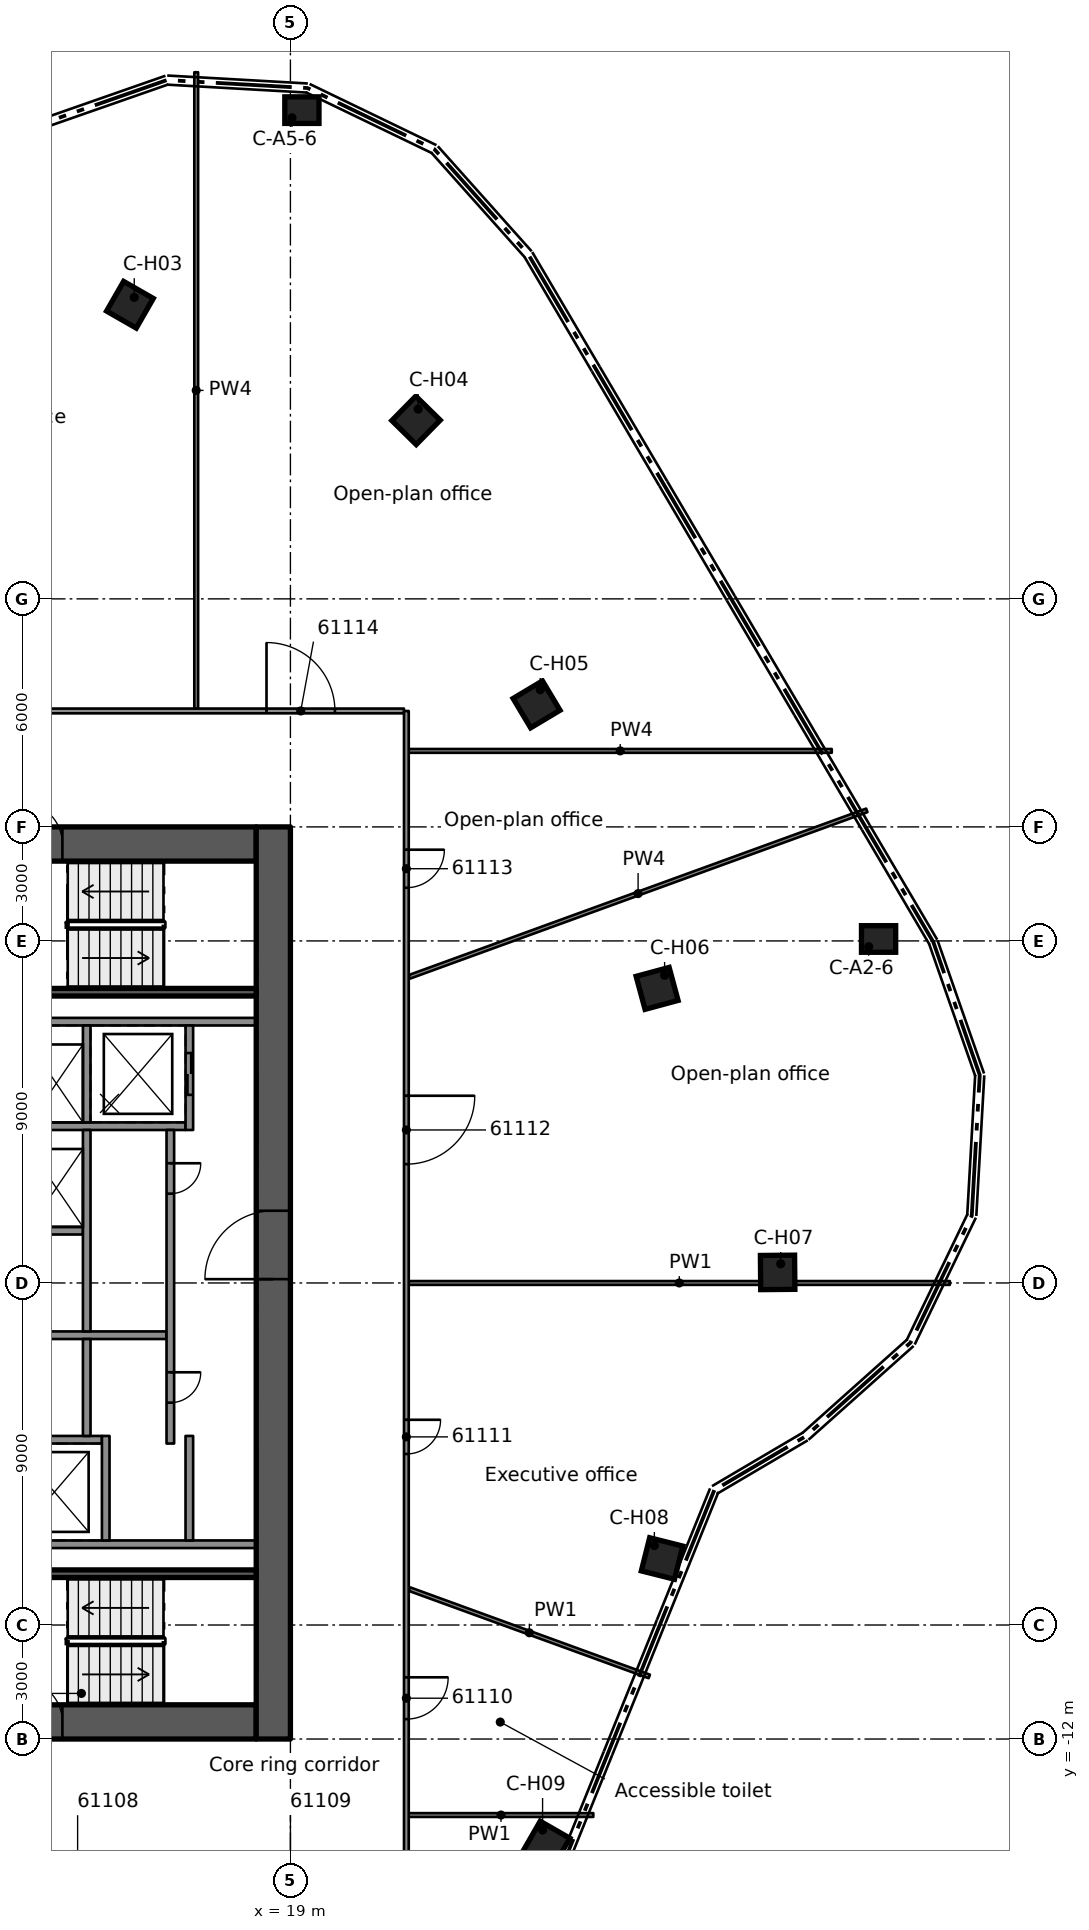
"""IFC4 building model, lengths in metres.
Left out: names, types, materials, properties, quantities, classifications, styles, units other than length and angle.
Written with IfcOpenShell. Run it as: python <this file> out.ifc"""

import sys

from ifc_helpers import new_model, si_unit, direction, frame, frame_2d, origin, origin_2d, place, context, subcontext, project, spatial, rectangle, extrude, element, fill, save


model = new_model("IFC4")
c1 = context("Model", 3, precision=1e-05, world=origin(), true_north=direction((0.0, 1.0)))
c2 = subcontext(c1, "Body", "Model", "MODEL_VIEW")
j1 = project(units=[si_unit("LENGTHUNIT", "METRE"), si_unit("PLANEANGLEUNIT", "RADIAN")], contexts=[c1])
p1 = place(None, origin())
s1 = spatial("IfcSite", under=j1, at=p1, CompositionType="ELEMENT")
p2 = place(p1, origin())
s2 = spatial("IfcBuilding", under=s1, at=p2, CompositionType="ELEMENT")
p3 = place(p2, frame((0.0, 0.0, 296.4)))
s3 = spatial("IfcBuildingStorey", under=s2, at=p3, CompositionType="ELEMENT", Elevation=296.4)
p4 = place(p3, frame((8.9, 11.55, 0.0), z_axis=(0.0, 0.0, 1.0), x_axis=(1.0, 0.0, 0.0)))
e1 = element("IfcWall", 1, at=p4, inside=s3, PredefinedType="SHEAR", context=c2, shape_type="SweptSolid", body=[
    extrude(rectangle(XDim=9.2, YDim=0.9, at=frame_2d((4.6, 0.0))), origin(), (0.0, 0.0, 1.0), 3.5),
])
p5 = place(p4, frame((3.0, 0.0, 0.0)))
e2 = element("IfcOpeningElement", 2, at=p5, cuts=e1, PredefinedType="OPENING", context=c2, shape_type="SweptSolid", body=[
    extrude(rectangle(XDim=1.1, YDim=2.1, at=frame_2d((0.55, 1.05))), frame((0.0, 0.46, 0.0), z_axis=(0.0, -1.0, 0.0), x_axis=(1.0, 0.0, 0.0)), (0.0, 0.0, 1.0), 0.92),
])
p6 = place(p4, frame((0.77, 0.0, 0.0)))
e3 = element("IfcOpeningElement", 3, at=p6, cuts=e1, PredefinedType="OPENING", context=c2, shape_type="SweptSolid", body=[
    extrude(rectangle(XDim=0.9, YDim=2.1, at=frame_2d((0.45, 1.05))), frame((0.0, 0.46, 0.0), z_axis=(0.0, -1.0, 0.0), x_axis=(1.0, 0.0, 0.0)), (0.0, 0.0, 1.0), 0.92),
])
p7 = place(p3, frame((8.9, -11.55, 0.0), z_axis=(0.0, 0.0, 1.0), x_axis=(1.0, 0.0, 0.0)))
e4 = element("IfcWall", 4, at=p7, inside=s3, PredefinedType="SHEAR", context=c2, shape_type="SweptSolid", body=[
    extrude(rectangle(XDim=9.2, YDim=0.9, at=frame_2d((4.6, 0.0))), origin(), (0.0, 0.0, 1.0), 3.5),
])
p8 = place(p7, frame((3.0, 0.0, 0.0)))
e5 = element("IfcOpeningElement", 5, at=p8, cuts=e4, PredefinedType="OPENING", context=c2, shape_type="SweptSolid", body=[
    extrude(rectangle(XDim=1.1, YDim=2.1, at=frame_2d((0.55, 1.05))), frame((0.0, 0.46, 0.0), z_axis=(0.0, -1.0, 0.0), x_axis=(1.0, 0.0, 0.0)), (0.0, 0.0, 1.0), 0.92),
])
p9 = place(p3, frame((18.55, -12.0, 0.0), z_axis=(0.0, 0.0, 1.0), x_axis=(0.0, 1.0, 0.0)))
e6 = element("IfcWall", 6, at=p9, inside=s3, PredefinedType="SHEAR", context=c2, shape_type="SweptSolid", body=[
    extrude(rectangle(XDim=24.0, YDim=0.9, at=frame_2d((12.0, 0.0))), origin(), (0.0, 0.0, 1.0), 3.5),
])
p10 = place(p9, frame((12.1, 0.0, 0.0)))
e7 = element("IfcOpeningElement", 7, at=p10, cuts=e6, PredefinedType="OPENING", context=c2, shape_type="SweptSolid", body=[
    extrude(rectangle(XDim=1.8, YDim=2.1, at=frame_2d((0.9, 1.05))), frame((0.0, 0.46, 0.0), z_axis=(0.0, -1.0, 0.0), x_axis=(1.0, 0.0, 0.0)), (0.0, 0.0, 1.0), 0.92),
])
for number, where, z_axis, x_axis in (
    (8, (34.477, 9.051, 0.0), (0.0, 0.0, 1.0), (1.0, 0.0, 0.0)),
    (9, (19.302, 30.86, 0.0), (0.0, 0.0, 1.0), (1.0, 0.0, 0.0)),
):
    element("IfcColumn", number, at=place(p3, frame(where, z_axis=z_axis, x_axis=x_axis)), inside=s3, PredefinedType="COLUMN", context=c2, shape_type="SweptSolid", body=[
        extrude(rectangle(XDim=0.9, YDim=0.7, at=origin_2d()), origin(), (0.0, 0.0, 1.0), 3.5),
    ])
for number, where, z_axis, x_axis in (
    (10, (14.777, 25.739, 0.0), (0.0, 0.0, 1.0), (0.498, 0.867, 0.0)),
    (11, (22.305, 22.697, 0.0), (0.0, 0.0, 1.0), (0.701, 0.713, 0.0)),
    (12, (25.477, 15.224, 0.0), (0.0, 0.0, 1.0), (0.858, 0.513, 0.0)),
    (13, (28.649, 7.751, 0.0), (0.0, 0.0, 1.0), (0.965, 0.261, 0.0)),
    (14, (31.821, 0.278, 0.0), (0.0, 0.0, 1.0), (1.0, 0.009, 0.0)),
    (15, (28.78, -7.25, 0.0), (0.0, 0.0, 1.0), (0.97, -0.244, 0.0)),
    (16, (25.739, -14.777, 0.0), (0.0, 0.0, 1.0), (0.867, -0.498, 0.0)),
):
    element("IfcColumn", number, at=place(p3, frame(where, z_axis=z_axis, x_axis=x_axis)), inside=s3, PredefinedType="COLUMN", context=c2, shape_type="SweptSolid", body=[
        extrude(rectangle(XDim=0.9, YDim=0.9, at=origin_2d()), origin(), (0.0, 0.0, 1.0), 3.5),
    ])
for number, where, z_axis, x_axis in (
    (17, (11.54, -6.875, 0.0), (0.0, 0.0, 1.0), (1.0, 0.0, 0.0)),
    (18, (11.54, 6.875, 0.0), (0.0, 0.0, 1.0), (1.0, 0.0, 0.0)),
):
    element("IfcWall", number, at=place(p3, frame(where, z_axis=z_axis, x_axis=x_axis)), inside=s3, PredefinedType="SOLIDWALL", context=c2, shape_type="SweptSolid", body=[
        extrude(rectangle(XDim=6.56, YDim=0.2, at=frame_2d((3.28, 0.0))), origin(), (0.0, 0.0, 1.0), 3.05),
    ])
p11 = place(p3, frame((11.54, 4.125, 0.0), z_axis=(0.0, 0.0, 1.0), x_axis=(1.0, 0.0, 0.0)))
e19 = element("IfcWall", 19, at=p11, inside=s3, PredefinedType="SOLIDWALL", context=c2, shape_type="SweptSolid", body=[
    extrude(rectangle(XDim=4.7, YDim=0.2, at=frame_2d((2.35, 0.0))), origin(), (0.0, 0.0, 1.0), 3.05),
])
p12 = place(p3, frame((11.54, 1.375, 0.0), z_axis=(0.0, 0.0, 1.0), x_axis=(1.0, 0.0, 0.0)))
e20 = element("IfcWall", 20, at=p12, inside=s3, PredefinedType="SOLIDWALL", context=c2, shape_type="SweptSolid", body=[
    extrude(rectangle(XDim=2.0, YDim=0.2, at=frame_2d((1.0, 0.0))), origin(), (0.0, 0.0, 1.0), 3.05),
])
p13 = place(p3, frame((11.54, -1.375, 0.0), z_axis=(0.0, 0.0, 1.0), x_axis=(1.0, 0.0, 0.0)))
e21 = element("IfcWall", 21, at=p13, inside=s3, PredefinedType="SOLIDWALL", context=c2, shape_type="SweptSolid", body=[
    extrude(rectangle(XDim=4.2, YDim=0.2, at=frame_2d((2.1, 0.0))), origin(), (0.0, 0.0, 1.0), 3.05),
])
p14 = place(p3, frame((11.54, -4.125, 0.0), z_axis=(0.0, 0.0, 1.0), x_axis=(1.0, 0.0, 0.0)))
e22 = element("IfcWall", 22, at=p14, inside=s3, PredefinedType="SOLIDWALL", context=c2, shape_type="SweptSolid", body=[
    extrude(rectangle(XDim=2.5, YDim=0.2, at=frame_2d((1.25, 0.0))), origin(), (0.0, 0.0, 1.0), 3.05),
])
p15 = place(p3, frame((13.64, 6.775, 0.0), z_axis=(0.0, 0.0, 1.0), x_axis=(0.0, -1.0, 0.0)))
e23 = element("IfcWall", 23, at=p15, inside=s3, PredefinedType="SOLIDWALL", context=c2, shape_type="SweptSolid", body=[
    extrude(rectangle(XDim=2.55, YDim=0.2, at=frame_2d((1.275, 0.0))), origin(), (0.0, 0.0, 1.0), 3.05),
])
p16 = place(p3, frame((13.64, 4.025, 0.0), z_axis=(0.0, 0.0, 1.0), x_axis=(0.0, -1.0, 0.0)))
e24 = element("IfcWall", 24, at=p16, inside=s3, PredefinedType="SOLIDWALL", context=c2, shape_type="SweptSolid", body=[
    extrude(rectangle(XDim=5.3, YDim=0.2, at=frame_2d((2.65, 0.0))), origin(), (0.0, 0.0, 1.0), 3.05),
])
p17 = place(p3, frame((13.64, -1.475, 0.0), z_axis=(0.0, 0.0, 1.0), x_axis=(0.0, -1.0, 0.0)))
e25 = element("IfcWall", 25, at=p17, inside=s3, PredefinedType="SOLIDWALL", context=c2, shape_type="SweptSolid", body=[
    extrude(rectangle(XDim=2.55, YDim=0.2, at=frame_2d((1.275, 0.0))), origin(), (0.0, 0.0, 1.0), 3.05),
])
p18 = place(p3, frame((14.14, -4.025, 0.0), z_axis=(0.0, 0.0, 1.0), x_axis=(0.0, -1.0, 0.0)))
e26 = element("IfcWall", 26, at=p18, inside=s3, PredefinedType="SOLIDWALL", context=c2, shape_type="SweptSolid", body=[
    extrude(rectangle(XDim=2.75, YDim=0.2, at=frame_2d((1.375, 0.0))), origin(), (0.0, 0.0, 1.0), 3.05),
])
p19 = place(p3, frame((16.34, 6.775, 0.0), z_axis=(0.0, 0.0, 1.0), x_axis=(0.0, -1.0, 0.0)))
e27 = element("IfcWall", 27, at=p19, inside=s3, PredefinedType="SOLIDWALL", context=c2, shape_type="SweptSolid", body=[
    extrude(rectangle(XDim=2.75, YDim=0.2, at=frame_2d((1.375, 0.0))), origin(), (0.0, 0.0, 1.0), 3.05),
])
p20 = place(p19, frame((0.725, 0.0, 0.0)))
e28 = element("IfcOpeningElement", 28, at=p20, cuts=e27, PredefinedType="OPENING", context=c2, shape_type="SweptSolid", body=[
    extrude(rectangle(XDim=1.1, YDim=2.1, at=frame_2d((0.55, 1.05))), frame((0.0, 0.11, 0.0), z_axis=(0.0, -1.0, 0.0), x_axis=(1.0, 0.0, 0.0)), (0.0, 0.0, 1.0), 0.22),
])
p21 = place(p3, frame((15.84, 4.025, 0.0), z_axis=(0.0, 0.0, 1.0), x_axis=(0.0, -1.0, 0.0)))
e29 = element("IfcWall", 29, at=p21, inside=s3, PredefinedType="SOLIDWALL", context=c2, shape_type="SweptSolid", body=[
    extrude(rectangle(XDim=8.25, YDim=0.2, at=frame_2d((4.125, 0.0))), origin(), (0.0, 0.0, 1.0), 3.05),
])
p22 = place(p21, frame((0.875, 0.0, 0.0)))
e30 = element("IfcOpeningElement", 30, at=p22, cuts=e29, PredefinedType="OPENING", context=c2, shape_type="SweptSolid", body=[
    extrude(rectangle(XDim=0.8, YDim=2.1, at=frame_2d((0.4, 1.05))), frame((0.0, 0.11, 0.0), z_axis=(0.0, -1.0, 0.0), x_axis=(1.0, 0.0, 0.0)), (0.0, 0.0, 1.0), 0.22),
])
p23 = place(p21, frame((6.375, 0.0, 0.0)))
e31 = element("IfcOpeningElement", 31, at=p23, cuts=e29, PredefinedType="OPENING", context=c2, shape_type="SweptSolid", body=[
    extrude(rectangle(XDim=0.8, YDim=2.1, at=frame_2d((0.4, 1.05))), frame((0.0, 0.11, 0.0), z_axis=(0.0, -1.0, 0.0), x_axis=(1.0, 0.0, 0.0)), (0.0, 0.0, 1.0), 0.22),
])
p24 = place(p3, frame((16.34, -4.025, 0.0), z_axis=(0.0, 0.0, 1.0), x_axis=(0.0, -1.0, 0.0)))
e32 = element("IfcWall", 32, at=p24, inside=s3, PredefinedType="SOLIDWALL", context=c2, shape_type="SweptSolid", body=[
    extrude(rectangle(XDim=2.75, YDim=0.2, at=frame_2d((1.375, 0.0))), origin(), (0.0, 0.0, 1.0), 3.05),
])
for number, where, z_axis, x_axis in (
    (33, (11.54, -7.65, 0.0), (0.0, 0.0, 1.0), (1.0, 0.0, 0.0)),
    (34, (11.54, 7.65, 0.0), (0.0, 0.0, 1.0), (1.0, 0.0, 0.0)),
):
    element("IfcWall", number, at=place(p3, frame(where, z_axis=z_axis, x_axis=x_axis)), inside=s3, PredefinedType="SOLIDWALL", context=c2, shape_type="SweptSolid", body=[
        extrude(rectangle(XDim=6.56, YDim=0.2, at=frame_2d((3.28, 0.0))), origin(), (0.0, 0.0, 1.0), 3.05),
    ])
p25 = place(p3, frame((22.131, -8.055, 0.0), z_axis=(0.0, 0.0, 1.0), x_axis=(0.939658582815, -0.342113647406, 0.0)))
e35 = element("IfcWall", 35, at=p25, inside=s3, PredefinedType="PARTITIONING", context=c2, shape_type="SweptSolid", body=[
    extrude(rectangle(XDim=6.717, YDim=0.1, at=frame_2d((3.359, 0.0))), origin(), (0.0, 0.0, 1.0), 3.03),
])
p26 = place(p3, frame((22.113, -14.0, 0.0), z_axis=(0.0, 0.0, 1.0), x_axis=(1.0, 0.0, 0.0)))
e36 = element("IfcWall", 36, at=p26, inside=s3, PredefinedType="PARTITIONING", context=c2, shape_type="SweptSolid", body=[
    extrude(rectangle(XDim=4.857, YDim=0.1, at=frame_2d((2.428, 0.0))), origin(), (0.0, 0.0, 1.0), 3.03),
])
p27 = place(p3, frame((22.113, 0.0, 0.0), z_axis=(0.0, 0.0, 1.0), x_axis=(1.0, 0.0, 0.0)))
e37 = element("IfcWall", 37, at=p27, inside=s3, PredefinedType="PARTITIONING", context=c2, shape_type="SweptSolid", body=[
    extrude(rectangle(XDim=14.24, YDim=0.1, at=frame_2d((7.12, 0.0))), origin(), (0.0, 0.0, 1.0), 3.03),
])
p28 = place(p3, frame((22.113, 14.0, 0.0), z_axis=(0.0, 0.0, 1.0), x_axis=(1.0, 0.0, 0.0)))
e38 = element("IfcWall", 38, at=p28, inside=s3, PredefinedType="PARTITIONING", context=c2, shape_type="SweptSolid", body=[
    extrude(rectangle(XDim=11.132, YDim=0.1, at=frame_2d((5.566, 0.0))), origin(), (0.0, 0.0, 1.0), 2.395),
])
p29 = place(p3, frame((10.991, 15.051, 0.0), z_axis=(0.0, 0.0, 1.0), x_axis=(1.0, 0.0, 0.0)))
e39 = element("IfcWall", 39, at=p29, inside=s3, PredefinedType="PARTITIONING", context=c2, shape_type="SweptSolid", body=[
    extrude(rectangle(XDim=10.997, YDim=0.125, at=frame_2d((5.499, 0.0))), origin(), (0.0, 0.0, 1.0), 3.03),
])
p30 = place(p29, frame((7.38, 0.0, 0.0)))
e40 = element("IfcOpeningElement", 40, at=p30, cuts=e39, PredefinedType="OPENING", context=c2, shape_type="SweptSolid", body=[
    extrude(rectangle(XDim=1.8, YDim=2.1, at=frame_2d((0.9, 1.05))), frame((0.0, 0.073, 0.0), z_axis=(0.0, -1.0, 0.0), x_axis=(1.0, 0.0, 0.0)), (0.0, 0.0, 1.0), 0.145),
])
p31 = place(p3, frame((22.131, 8.055, 0.0), z_axis=(0.0, 0.0, 1.0), x_axis=(0.939707130354, 0.341980275983, 0.0)))
e41 = element("IfcWall", 41, at=p31, inside=s3, PredefinedType="PARTITIONING", context=c2, shape_type="SweptSolid", body=[
    extrude(rectangle(XDim=12.808, YDim=0.1, at=frame_2d((6.404, 0.0))), origin(), (0.0, 0.0, 1.0), 2.395),
])
p32 = place(p3, frame((22.051, 15.05, 0.0), z_axis=(0.0, 0.0, 1.0), x_axis=(0.0, -1.0, 0.0)))
e42 = element("IfcWall", 42, at=p32, inside=s3, PredefinedType="PARTITIONING", context=c2, shape_type="SweptSolid", body=[
    extrude(rectangle(XDim=30.1, YDim=0.125, at=frame_2d((15.05, 0.0))), origin(), (0.0, 0.0, 1.0), 3.03),
])
p33 = place(p32, frame((25.426, 0.0, 0.0)))
e43 = element("IfcOpeningElement", 43, at=p33, cuts=e42, PredefinedType="OPENING", context=c2, shape_type="SweptSolid", body=[
    extrude(rectangle(XDim=1.1, YDim=2.1, at=frame_2d((0.55, 1.05))), frame((0.0, 0.073, 0.0), z_axis=(0.0, -1.0, 0.0), x_axis=(1.0, 0.0, 0.0)), (0.0, 0.0, 1.0), 0.145),
])
p34 = place(p32, frame((18.65, 0.0, 0.0)))
e44 = element("IfcOpeningElement", 44, at=p34, cuts=e42, PredefinedType="OPENING", context=c2, shape_type="SweptSolid", body=[
    extrude(rectangle(XDim=0.9, YDim=2.1, at=frame_2d((0.45, 1.05))), frame((0.0, 0.073, 0.0), z_axis=(0.0, -1.0, 0.0), x_axis=(1.0, 0.0, 0.0)), (0.0, 0.0, 1.0), 0.145),
])
p35 = place(p32, frame((10.124, 0.0, 0.0)))
e45 = element("IfcOpeningElement", 45, at=p35, cuts=e42, PredefinedType="OPENING", context=c2, shape_type="SweptSolid", body=[
    extrude(rectangle(XDim=1.8, YDim=2.1, at=frame_2d((0.9, 1.05))), frame((0.0, 0.073, 0.0), z_axis=(0.0, -1.0, 0.0), x_axis=(1.0, 0.0, 0.0)), (0.0, 0.0, 1.0), 0.145),
])
p36 = place(p32, frame((3.65, 0.0, 0.0)))
e46 = element("IfcOpeningElement", 46, at=p36, cuts=e42, PredefinedType="OPENING", context=c2, shape_type="SweptSolid", body=[
    extrude(rectangle(XDim=1.0, YDim=2.1, at=frame_2d((0.5, 1.05))), frame((0.0, 0.073, 0.0), z_axis=(0.0, -1.0, 0.0), x_axis=(1.0, 0.0, 0.0)), (0.0, 0.0, 1.0), 0.145),
])
p37 = place(p3, frame((16.521, 15.114, 0.0), z_axis=(0.0, 0.0, 1.0), x_axis=(0.0, 1.0, 0.0)))
e47 = element("IfcWall", 47, at=p37, inside=s3, PredefinedType="PARTITIONING", context=c2, shape_type="SweptSolid", body=[
    extrude(rectangle(XDim=16.743, YDim=0.1, at=frame_2d((8.372, 0.0))), origin(), (0.0, 0.0, 1.0), 2.395),
])
p38 = place(p20, origin())
e48 = element("IfcDoor", 48, at=p38, inside=s3, OperationType="DOUBLE_DOOR_SLIDING", PredefinedType="DOOR", context=c2, shape_type="SweptSolid", body=[
    extrude(rectangle(XDim=1.1, YDim=2.1, at=frame_2d((0.55, 1.05))), frame((0.0, 0.025, 0.0), z_axis=(0.0, -1.0, 0.0), x_axis=(1.0, 0.0, 0.0)), (0.0, 0.0, 1.0), 0.05),
])
fill(e28, e48)
p39 = place(p22, origin())
e49 = element("IfcDoor", 49, at=p39, inside=s3, OperationType="SINGLE_SWING_LEFT", PredefinedType="DOOR", context=c2, shape_type="SweptSolid", body=[
    extrude(rectangle(XDim=0.8, YDim=2.1, at=frame_2d((0.4, 1.05))), frame((0.0, 0.025, 0.0), z_axis=(0.0, -1.0, 0.0), x_axis=(1.0, 0.0, 0.0)), (0.0, 0.0, 1.0), 0.05),
])
fill(e30, e49)
p40 = place(p23, origin())
e50 = element("IfcDoor", 50, at=p40, inside=s3, OperationType="SINGLE_SWING_LEFT", PredefinedType="DOOR", context=c2, shape_type="SweptSolid", body=[
    extrude(rectangle(XDim=0.8, YDim=2.1, at=frame_2d((0.4, 1.05))), frame((0.0, 0.025, 0.0), z_axis=(0.0, -1.0, 0.0), x_axis=(1.0, 0.0, 0.0)), (0.0, 0.0, 1.0), 0.05),
])
fill(e31, e50)
p41 = place(p10, origin())
e51 = element("IfcDoor", 51, at=p41, inside=s3, OperationType="SINGLE_SWING_RIGHT", PredefinedType="DOOR", context=c2, shape_type="SweptSolid", body=[
    extrude(rectangle(XDim=1.8, YDim=2.1, at=frame_2d((0.9, 1.05))), frame((0.0, 0.025, 0.0), z_axis=(0.0, -1.0, 0.0), x_axis=(1.0, 0.0, 0.0)), (0.0, 0.0, 1.0), 0.05),
])
fill(e7, e51)
p42 = place(p8, origin())
e52 = element("IfcDoor", 52, at=p42, inside=s3, OperationType="SINGLE_SWING_LEFT", PredefinedType="DOOR", context=c2, shape_type="SweptSolid", body=[
    extrude(rectangle(XDim=1.1, YDim=2.1, at=frame_2d((0.55, 1.05))), frame((0.0, 0.025, 0.0), z_axis=(0.0, -1.0, 0.0), x_axis=(1.0, 0.0, 0.0)), (0.0, 0.0, 1.0), 0.05),
])
fill(e5, e52)
p43 = place(p5, origin())
e53 = element("IfcDoor", 53, at=p43, inside=s3, OperationType="SINGLE_SWING_LEFT", PredefinedType="DOOR", context=c2, shape_type="SweptSolid", body=[
    extrude(rectangle(XDim=1.1, YDim=2.1, at=frame_2d((0.55, 1.05))), frame((0.0, 0.025, 0.0), z_axis=(0.0, -1.0, 0.0), x_axis=(1.0, 0.0, 0.0)), (0.0, 0.0, 1.0), 0.05),
])
fill(e2, e53)
p44 = place(p33, origin())
e54 = element("IfcDoor", 54, at=p44, inside=s3, OperationType="SINGLE_SWING_RIGHT", PredefinedType="DOOR", context=c2, shape_type="SweptSolid", body=[
    extrude(rectangle(XDim=1.1, YDim=2.1, at=frame_2d((0.55, 1.05))), frame((0.0, 0.025, 0.0), z_axis=(0.0, -1.0, 0.0), x_axis=(1.0, 0.0, 0.0)), (0.0, 0.0, 1.0), 0.05),
])
fill(e43, e54)
p45 = place(p34, origin())
e55 = element("IfcDoor", 55, at=p45, inside=s3, OperationType="SINGLE_SWING_RIGHT", PredefinedType="DOOR", context=c2, shape_type="SweptSolid", body=[
    extrude(rectangle(XDim=0.9, YDim=2.1, at=frame_2d((0.45, 1.05))), frame((0.0, 0.025, 0.0), z_axis=(0.0, -1.0, 0.0), x_axis=(1.0, 0.0, 0.0)), (0.0, 0.0, 1.0), 0.05),
])
fill(e44, e55)
p46 = place(p35, origin())
e56 = element("IfcDoor", 56, at=p46, inside=s3, OperationType="DOUBLE_DOOR_SINGLE_SWING", PredefinedType="DOOR", context=c2, shape_type="SweptSolid", body=[
    extrude(rectangle(XDim=1.8, YDim=2.1, at=frame_2d((0.9, 1.05))), frame((0.0, 0.025, 0.0), z_axis=(0.0, -1.0, 0.0), x_axis=(1.0, 0.0, 0.0)), (0.0, 0.0, 1.0), 0.05),
])
fill(e45, e56)
p47 = place(p36, origin())
e57 = element("IfcDoor", 57, at=p47, inside=s3, OperationType="SINGLE_SWING_LEFT", PredefinedType="DOOR", context=c2, shape_type="SweptSolid", body=[
    extrude(rectangle(XDim=1.0, YDim=2.1, at=frame_2d((0.5, 1.05))), frame((0.0, 0.025, 0.0), z_axis=(0.0, -1.0, 0.0), x_axis=(1.0, 0.0, 0.0)), (0.0, 0.0, 1.0), 0.05),
])
fill(e46, e57)
p48 = place(p30, origin())
e58 = element("IfcDoor", 58, at=p48, inside=s3, OperationType="DOUBLE_DOOR_SINGLE_SWING", PredefinedType="DOOR", context=c2, shape_type="SweptSolid", body=[
    extrude(rectangle(XDim=1.8, YDim=2.1, at=frame_2d((0.9, 1.05))), frame((0.0, 0.025, 0.0), z_axis=(0.0, -1.0, 0.0), x_axis=(1.0, 0.0, 0.0)), (0.0, 0.0, 1.0), 0.05),
])
fill(e40, e58)
save(model, sys.argv[1])
